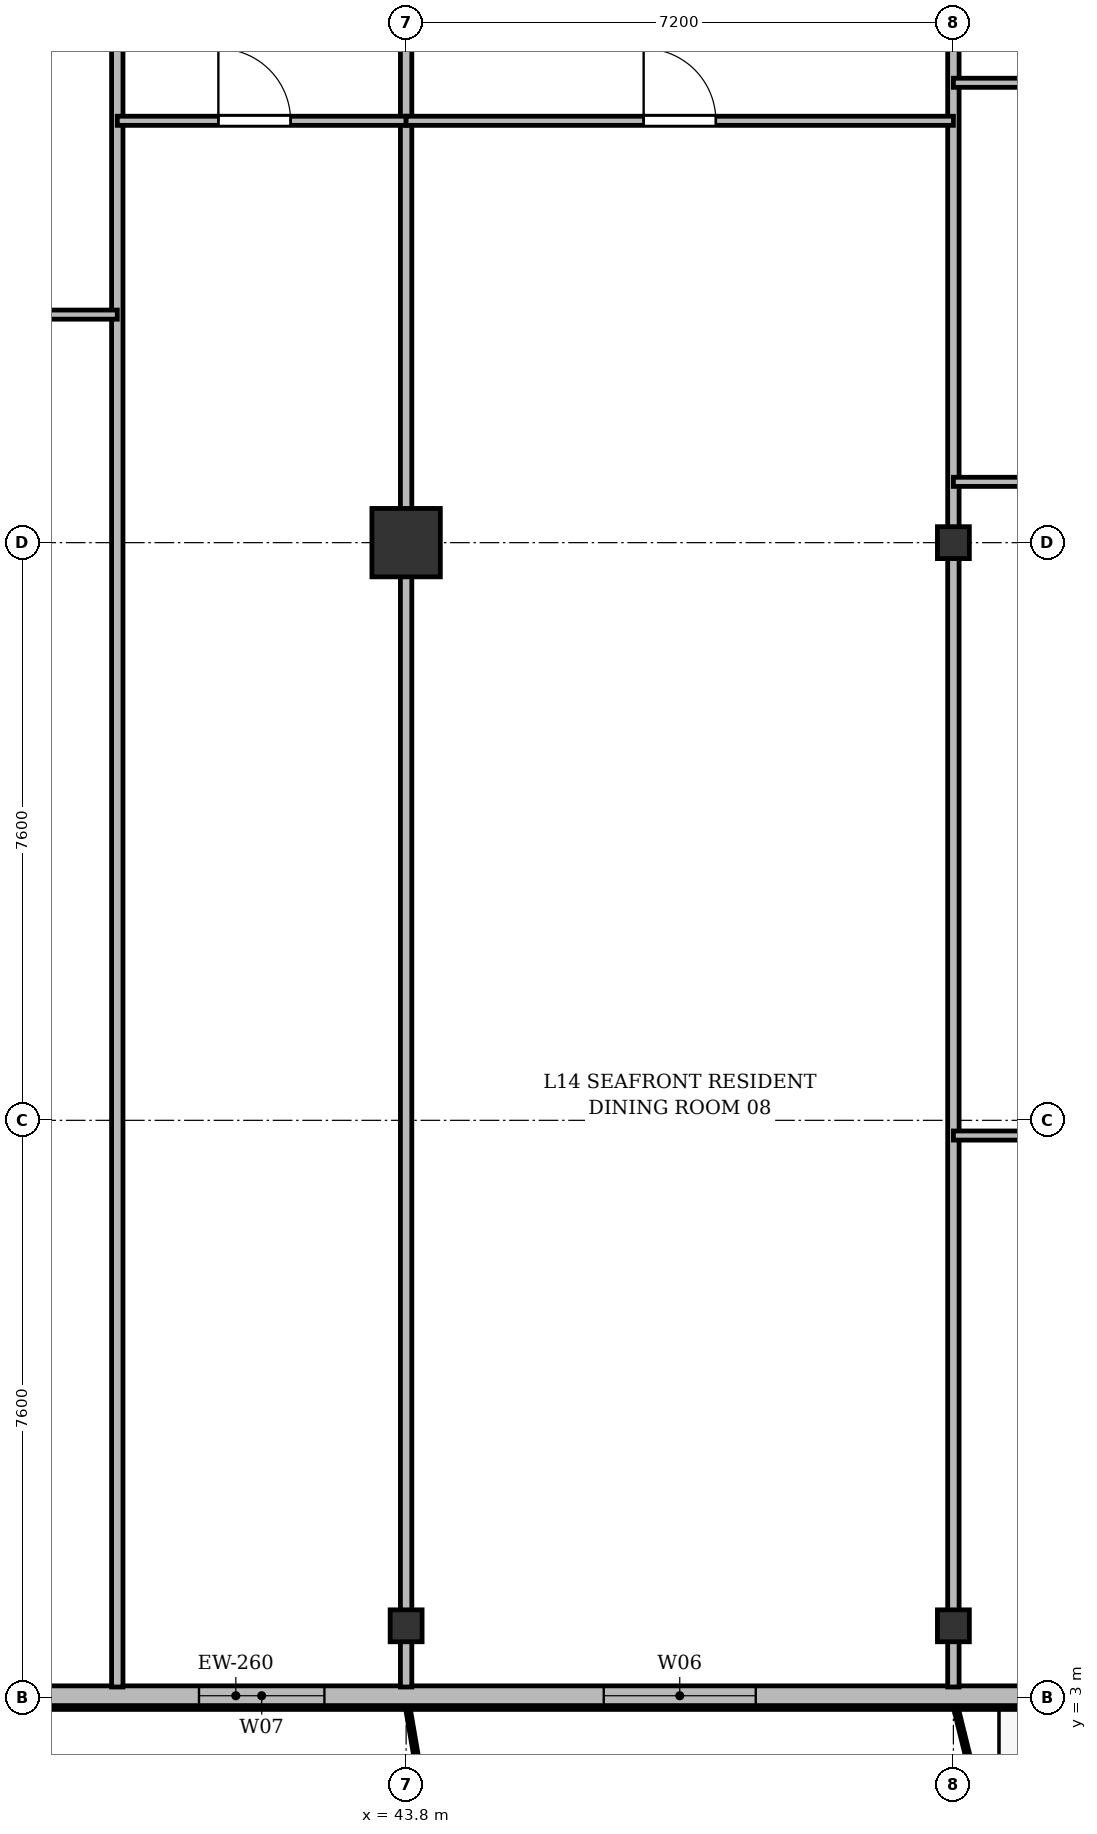
"""IFC4 building model, lengths in metres.
Left out: names, types, materials, properties, quantities, classifications, styles, units other than length and angle.
Written with IfcOpenShell. Run it as: python <this file> out.ifc"""

import sys

from ifc_helpers import new_model, si_unit, direction, frame, frame_2d, origin, origin_2d, place, context, subcontext, project, spatial, rectangle, i_section, extrude, source, transform, mapped, element, fill, save


model = new_model("IFC4")
c1 = context("Model", 3, precision=1e-05, world=origin(), true_north=direction((0.0, 1.0)))
c2 = subcontext(c1, "Body", "Model", "MODEL_VIEW")
j1 = project(units=[si_unit("LENGTHUNIT", "METRE"), si_unit("PLANEANGLEUNIT", "RADIAN")], contexts=[c1])
p1 = place(None, origin())
s1 = spatial("IfcSite", under=j1, at=p1, CompositionType="ELEMENT")
p2 = place(p1, origin())
s2 = spatial("IfcBuilding", under=s1, at=p2, CompositionType="ELEMENT")
p3 = place(p2, frame((0.0, 0.0, 55.9)))
s3 = spatial("IfcBuildingStorey", under=s2, at=p3, CompositionType="ELEMENT", Elevation=55.9)
m1 = source(origin(), c2, "Body", "SweptSolid", [
    extrude(i_section(OverallWidth=0.42, OverallDepth=0.42, WebThickness=0.026, FlangeThickness=0.04, at=origin_2d()), origin(), (0.0, 0.0, 1.0), 3.6),
])
p4 = place(p3, frame((43.8, 3.95, 0.0), z_axis=(0.0, 0.0, 1.0), x_axis=(1.0, 0.0, 0.0)))
e1 = element("IfcColumn", 1, at=p4, inside=s3, PredefinedType="COLUMN", context=c2, shape_type="MappedRepresentation", body=[
    mapped(m1, transform((0.0, 0.0, 0.0), x_axis=(1.0, 0.0, 0.0), y_axis=(0.0, 1.0, 0.0), z_axis=(0.0, 0.0, 1.0), scale=1.0)),
])
m2 = source(origin(), c2, "Body", "SweptSolid", [
    extrude(rectangle(XDim=0.9, YDim=0.9, at=origin_2d()), origin(), (0.0, 0.0, 1.0), 3.6),
])
p5 = place(p3, frame((43.8, 18.2, 0.0), z_axis=(0.0, 0.0, 1.0), x_axis=(1.0, 0.0, 0.0)))
e2 = element("IfcColumn", 2, at=p5, inside=s3, PredefinedType="COLUMN", context=c2, shape_type="MappedRepresentation", body=[
    mapped(m2, transform((0.0, 0.0, 0.0), x_axis=(1.0, 0.0, 0.0), y_axis=(0.0, 1.0, 0.0), z_axis=(0.0, 0.0, 1.0), scale=1.0)),
])
for number, where, z_axis, x_axis in (
    (3, (51.0, 3.95, 0.0), (0.0, 0.0, 1.0), (1.0, 0.0, 0.0)),
    (4, (51.0, 18.2, 0.0), (0.0, 0.0, 1.0), (1.0, 0.0, 0.0)),
):
    element("IfcColumn", number, at=place(p3, frame(where, z_axis=z_axis, x_axis=x_axis)), inside=s3, PredefinedType="COLUMN", context=c2, shape_type="MappedRepresentation", body=[
        mapped(m1, transform((0.0, 0.0, 0.0), x_axis=(1.0, 0.0, 0.0), y_axis=(0.0, 1.0, 0.0), z_axis=(0.0, 0.0, 1.0), scale=1.0)),
    ])
p6 = place(p3, frame((66.9, 3.03, 0.0), z_axis=(0.0, 0.0, 1.0), x_axis=(-1.0, 0.0, 0.0)))
e5 = element("IfcWall", 5, at=p6, inside=s3, PredefinedType="SOLIDWALL", context=c2, shape_type="SweptSolid", body=[
    extrude(rectangle(XDim=59.4, YDim=0.26, at=frame_2d((29.7, 0.0))), origin(), (0.0, 0.0, 1.0), 3.34),
])
p7 = place(p6, frame((3.8, 0.0, 0.9)))
e6 = element("IfcOpeningElement", 6, at=p7, cuts=e5, PredefinedType="OPENING", context=c2, shape_type="SweptSolid", body=[
    extrude(rectangle(XDim=1.8, YDim=1.8, at=frame_2d((0.9, 0.9))), frame((0.0, 0.14, 0.0), z_axis=(0.0, -1.0, 0.0), x_axis=(1.0, 0.0, 0.0)), (0.0, 0.0, 1.0), 0.28),
])
p8 = place(p6, frame((9.18, 0.0, 0.0)))
e7 = element("IfcOpeningElement", 7, at=p8, cuts=e5, PredefinedType="OPENING", context=c2, shape_type="SweptSolid", body=[
    extrude(rectangle(XDim=1.2, YDim=2.2, at=frame_2d((0.6, 1.1))), frame((0.0, 0.14, 0.0), z_axis=(0.0, -1.0, 0.0), x_axis=(1.0, 0.0, 0.0)), (0.0, 0.0, 1.0), 0.28),
])
p9 = place(p6, frame((13.2, 0.0, 0.9)))
e8 = element("IfcOpeningElement", 8, at=p9, cuts=e5, PredefinedType="OPENING", context=c2, shape_type="SweptSolid", body=[
    extrude(rectangle(XDim=1.5, YDim=1.75, at=frame_2d((0.75, 0.875))), frame((0.0, 0.14, 0.0), z_axis=(0.0, -1.0, 0.0), x_axis=(1.0, 0.0, 0.0)), (0.0, 0.0, 1.0), 0.28),
])
p10 = place(p6, frame((18.5, 0.0, 0.9)))
e9 = element("IfcOpeningElement", 9, at=p10, cuts=e5, PredefinedType="OPENING", context=c2, shape_type="SweptSolid", body=[
    extrude(rectangle(XDim=2.0, YDim=1.95, at=frame_2d((1.0, 0.975))), frame((0.0, 0.14, 0.0), z_axis=(0.0, -1.0, 0.0), x_axis=(1.0, 0.0, 0.0)), (0.0, 0.0, 1.0), 0.28),
])
p11 = place(p6, frame((24.175, 0.0, 0.9)))
e10 = element("IfcOpeningElement", 10, at=p11, cuts=e5, PredefinedType="OPENING", context=c2, shape_type="SweptSolid", body=[
    extrude(rectangle(XDim=1.65, YDim=1.85, at=frame_2d((0.825, 0.925))), frame((0.0, 0.14, 0.0), z_axis=(0.0, -1.0, 0.0), x_axis=(1.0, 0.0, 0.0)), (0.0, 0.0, 1.0), 0.28),
])
p12 = place(p6, frame((28.3, 0.0, 0.9)))
e11 = element("IfcOpeningElement", 11, at=p12, cuts=e5, PredefinedType="OPENING", context=c2, shape_type="SweptSolid", body=[
    extrude(rectangle(XDim=1.8, YDim=1.8, at=frame_2d((0.9, 0.9))), frame((0.0, 0.14, 0.0), z_axis=(0.0, -1.0, 0.0), x_axis=(1.0, 0.0, 0.0)), (0.0, 0.0, 1.0), 0.28),
])
p13 = place(p6, frame((32.8, 0.0, 0.9)))
e12 = element("IfcOpeningElement", 12, at=p13, cuts=e5, PredefinedType="OPENING", context=c2, shape_type="SweptSolid", body=[
    extrude(rectangle(XDim=2.2, YDim=1.8, at=frame_2d((1.1, 0.9))), frame((0.0, 0.14, 0.0), z_axis=(0.0, -1.0, 0.0), x_axis=(1.0, 0.0, 0.0)), (0.0, 0.0, 1.0), 0.28),
])
p14 = place(p6, frame((40.301, 0.0, 0.0)))
e13 = element("IfcOpeningElement", 13, at=p14, cuts=e5, PredefinedType="OPENING", context=c2, shape_type="SweptSolid", body=[
    extrude(rectangle(XDim=1.2, YDim=2.2, at=frame_2d((0.6, 1.1))), frame((0.0, 0.14, 0.0), z_axis=(0.0, -1.0, 0.0), x_axis=(1.0, 0.0, 0.0)), (0.0, 0.0, 1.0), 0.28),
])
p15 = place(p6, frame((46.4, 0.0, 0.9)))
e14 = element("IfcOpeningElement", 14, at=p15, cuts=e5, PredefinedType="OPENING", context=c2, shape_type="SweptSolid", body=[
    extrude(rectangle(XDim=2.0, YDim=1.95, at=frame_2d((1.0, 0.975))), frame((0.0, 0.14, 0.0), z_axis=(0.0, -1.0, 0.0), x_axis=(1.0, 0.0, 0.0)), (0.0, 0.0, 1.0), 0.28),
])
p16 = place(p6, frame((53.136, 0.0, 0.0)))
e15 = element("IfcOpeningElement", 15, at=p16, cuts=e5, PredefinedType="OPENING", context=c2, shape_type="SweptSolid", body=[
    extrude(rectangle(XDim=1.2, YDim=2.2, at=frame_2d((0.6, 1.1))), frame((0.0, 0.14, 0.0), z_axis=(0.0, -1.0, 0.0), x_axis=(1.0, 0.0, 0.0)), (0.0, 0.0, 1.0), 0.28),
])
p17 = place(p6, frame((55.5, 0.0, 0.9)))
e16 = element("IfcOpeningElement", 16, at=p17, cuts=e5, PredefinedType="OPENING", context=c2, shape_type="SweptSolid", body=[
    extrude(rectangle(XDim=1.8, YDim=1.8, at=frame_2d((0.9, 0.9))), frame((0.0, 0.14, 0.0), z_axis=(0.0, -1.0, 0.0), x_axis=(1.0, 0.0, 0.0)), (0.0, 0.0, 1.0), 0.28),
])
p18 = place(p3, frame((40.0, 3.145, 0.0), z_axis=(0.0, 0.0, 1.0), x_axis=(0.0, 1.0, 0.0)))
e17 = element("IfcWall", 17, at=p18, inside=s3, PredefinedType="PARTITIONING", context=c2, shape_type="SweptSolid", body=[
    extrude(rectangle(XDim=24.455, YDim=0.15, at=frame_2d((12.228, 0.0))), origin(), (0.0, 0.0, 1.0), 2.69),
])
for number, where, z_axis, x_axis in (
    (18, (43.8, 3.145, 0.0), (0.0, 0.0, 1.0), (0.0, 1.0, 0.0)),
    (19, (51.0, 3.145, 0.0), (0.0, 0.0, 1.0), (0.0, 1.0, 0.0)),
):
    element("IfcWall", number, at=place(p3, frame(where, z_axis=z_axis, x_axis=x_axis)), inside=s3, PredefinedType="PARTITIONING", context=c2, shape_type="SweptSolid", body=[
        extrude(rectangle(XDim=24.455, YDim=0.15, at=frame_2d((12.228, 0.0))), origin(), (0.0, 0.0, 1.0), 2.752),
    ])
p19 = place(p3, frame((35.4, 21.2, 0.0), z_axis=(0.0, 0.0, 1.0), x_axis=(1.0, 0.0, 0.0)))
e20 = element("IfcWall", 20, at=p19, inside=s3, PredefinedType="PARTITIONING", context=c2, shape_type="SweptSolid", body=[
    extrude(rectangle(XDim=4.6, YDim=0.12, at=frame_2d((2.3, 0.0))), origin(), (0.0, 0.0, 1.0), 3.34),
])
p20 = place(p19, frame((1.825, 0.0, 0.0)))
e21 = element("IfcOpeningElement", 21, at=p20, cuts=e20, PredefinedType="OPENING", context=c2, shape_type="SweptSolid", body=[
    extrude(rectangle(XDim=0.95, YDim=2.15, at=frame_2d((0.475, 1.075))), frame((0.0, 0.07, 0.0), z_axis=(0.0, -1.0, 0.0), x_axis=(1.0, 0.0, 0.0)), (0.0, 0.0, 1.0), 0.14),
])
p21 = place(p3, frame((40.0, 23.75, 0.0), z_axis=(0.0, 0.0, 1.0), x_axis=(1.0, 0.0, 0.0)))
e22 = element("IfcWall", 22, at=p21, inside=s3, PredefinedType="PARTITIONING", context=c2, shape_type="SweptSolid", body=[
    extrude(rectangle(XDim=3.8, YDim=0.12, at=frame_2d((1.9, 0.0))), origin(), (0.0, 0.0, 1.0), 2.752),
])
p22 = place(p21, frame((1.33, 0.0, 0.0)))
e23 = element("IfcOpeningElement", 23, at=p22, cuts=e22, PredefinedType="OPENING", context=c2, shape_type="SweptSolid", body=[
    extrude(rectangle(XDim=0.95, YDim=2.15, at=frame_2d((0.475, 1.075))), frame((0.0, 0.07, 0.0), z_axis=(0.0, -1.0, 0.0), x_axis=(1.0, 0.0, 0.0)), (0.0, 0.0, 1.0), 0.14),
])
p23 = place(p3, frame((43.8, 23.75, 0.0), z_axis=(0.0, 0.0, 1.0), x_axis=(1.0, 0.0, 0.0)))
e24 = element("IfcWall", 24, at=p23, inside=s3, PredefinedType="PARTITIONING", context=c2, shape_type="SweptSolid", body=[
    extrude(rectangle(XDim=7.2, YDim=0.12, at=frame_2d((3.6, 0.0))), origin(), (0.0, 0.0, 1.0), 2.752),
])
p24 = place(p23, frame((3.125, 0.0, 0.0)))
e25 = element("IfcOpeningElement", 25, at=p24, cuts=e24, PredefinedType="OPENING", context=c2, shape_type="SweptSolid", body=[
    extrude(rectangle(XDim=0.95, YDim=2.15, at=frame_2d((0.475, 1.075))), frame((0.0, 0.07, 0.0), z_axis=(0.0, -1.0, 0.0), x_axis=(1.0, 0.0, 0.0)), (0.0, 0.0, 1.0), 0.14),
])
p25 = place(p3, frame((51.0, 19.0, 0.0), z_axis=(0.0, 0.0, 1.0), x_axis=(1.0, 0.0, 0.0)))
e26 = element("IfcWall", 26, at=p25, inside=s3, PredefinedType="PARTITIONING", context=c2, shape_type="SweptSolid", body=[
    extrude(rectangle(XDim=7.8, YDim=0.12, at=frame_2d((3.9, 0.0))), origin(), (0.0, 0.0, 1.0), 2.752),
])
p26 = place(p25, frame((3.333, 0.0, 0.0)))
e27 = element("IfcOpeningElement", 27, at=p26, cuts=e26, PredefinedType="OPENING", context=c2, shape_type="SweptSolid", body=[
    extrude(rectangle(XDim=0.95, YDim=2.15, at=frame_2d((0.475, 1.075))), frame((0.0, 0.07, 0.0), z_axis=(0.0, -1.0, 0.0), x_axis=(1.0, 0.0, 0.0)), (0.0, 0.0, 1.0), 0.14),
])
p27 = place(p3, frame((51.0, 24.25, 0.0), z_axis=(0.0, 0.0, 1.0), x_axis=(1.0, 0.0, 0.0)))
e28 = element("IfcWall", 28, at=p27, inside=s3, PredefinedType="PARTITIONING", context=c2, shape_type="SweptSolid", body=[
    extrude(rectangle(XDim=2.4, YDim=0.12, at=frame_2d((1.2, 0.0))), origin(), (0.0, 0.0, 1.0), 2.752),
])
p28 = place(p3, frame((51.0, 10.4, 0.0), z_axis=(0.0, 0.0, 1.0), x_axis=(1.0, 0.0, 0.0)))
e29 = element("IfcWall", 29, at=p28, inside=s3, PredefinedType="PARTITIONING", context=c2, shape_type="SweptSolid", body=[
    extrude(rectangle(XDim=3.9, YDim=0.12, at=frame_2d((1.95, 0.0))), origin(), (0.0, 0.0, 1.0), 2.752),
])
p29 = place(p28, frame((1.475, 0.0, 0.0)))
e30 = element("IfcOpeningElement", 30, at=p29, cuts=e29, PredefinedType="OPENING", context=c2, shape_type="SweptSolid", body=[
    extrude(rectangle(XDim=0.95, YDim=2.15, at=frame_2d((0.475, 1.075))), frame((0.0, 0.07, 0.0), z_axis=(0.0, -1.0, 0.0), x_axis=(1.0, 0.0, 0.0)), (0.0, 0.0, 1.0), 0.14),
])
m3 = source(origin(), c2, "Body", "SweptSolid", [
    extrude(rectangle(XDim=2.0, YDim=1.95, at=frame_2d((1.0, 0.975))), frame((0.0, 0.03, 0.0), z_axis=(0.0, -1.0, 0.0), x_axis=(1.0, 0.0, 0.0)), (0.0, 0.0, 1.0), 0.06),
])
p30 = place(p10, origin())
e31 = element("IfcWindow", 31, at=p30, inside=s3, PartitioningType="SINGLE_PANEL", PredefinedType="WINDOW", context=c2, shape_type="MappedRepresentation", body=[
    mapped(m3, transform((0.0, 0.0, 0.0), x_axis=(1.0, 0.0, 0.0), y_axis=(0.0, 1.0, 0.0), z_axis=(0.0, 0.0, 1.0), scale=1.0)),
])
fill(e9, e31)
m4 = source(origin(), c2, "Body", "SweptSolid", [
    extrude(rectangle(XDim=1.65, YDim=1.85, at=frame_2d((0.825, 0.925))), frame((0.0, 0.03, 0.0), z_axis=(0.0, -1.0, 0.0), x_axis=(1.0, 0.0, 0.0)), (0.0, 0.0, 1.0), 0.06),
])
p31 = place(p11, origin())
e32 = element("IfcWindow", 32, at=p31, inside=s3, PartitioningType="SINGLE_PANEL", PredefinedType="WINDOW", context=c2, shape_type="MappedRepresentation", body=[
    mapped(m4, transform((0.0, 0.0, 0.0), x_axis=(1.0, 0.0, 0.0), y_axis=(0.0, 1.0, 0.0), z_axis=(0.0, 0.0, 1.0), scale=1.0)),
])
fill(e10, e32)
m5 = source(origin(), c2, "Body", "SweptSolid", [
    extrude(rectangle(XDim=0.95, YDim=2.15, at=frame_2d((0.475, 1.075))), frame((0.0, 0.025, 0.0), z_axis=(0.0, -1.0, 0.0), x_axis=(1.0, 0.0, 0.0)), (0.0, 0.0, 1.0), 0.05),
])
p32 = place(p22, origin())
e33 = element("IfcDoor", 33, at=p32, inside=s3, OperationType="SINGLE_SWING_LEFT", PredefinedType="DOOR", context=c2, shape_type="MappedRepresentation", body=[
    mapped(m5, transform((0.0, 0.0, 0.0), x_axis=(1.0, 0.0, 0.0), y_axis=(0.0, 1.0, 0.0), z_axis=(0.0, 0.0, 1.0), scale=1.0)),
])
fill(e23, e33)
p33 = place(p24, origin())
e34 = element("IfcDoor", 34, at=p33, inside=s3, OperationType="SINGLE_SWING_LEFT", PredefinedType="DOOR", context=c2, shape_type="MappedRepresentation", body=[
    mapped(m5, transform((0.0, 0.0, 0.0), x_axis=(1.0, 0.0, 0.0), y_axis=(0.0, 1.0, 0.0), z_axis=(0.0, 0.0, 1.0), scale=1.0)),
])
fill(e25, e34)
save(model, sys.argv[1])
